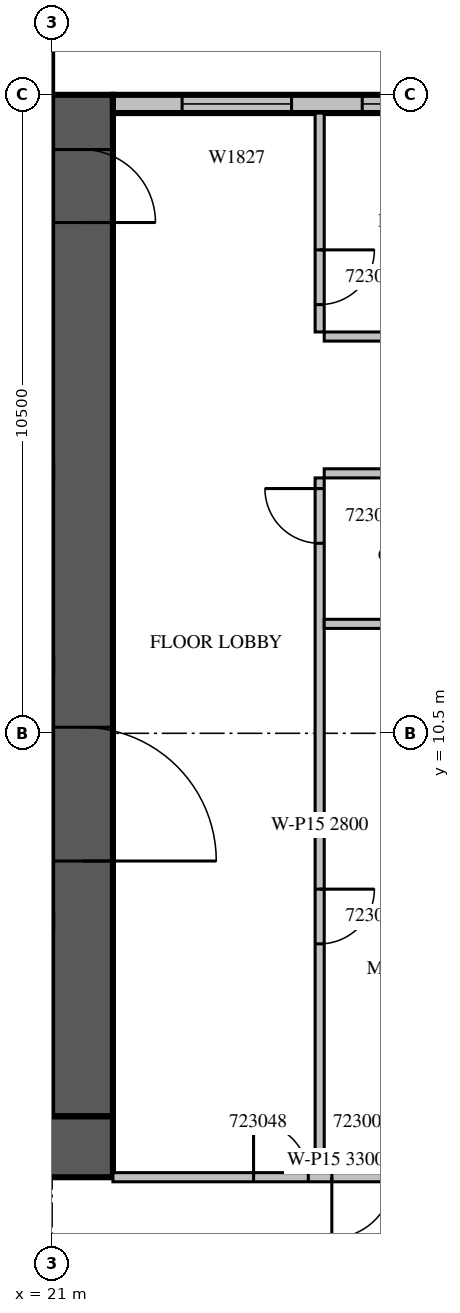
"""IFC4 building model, lengths in metres.
Left out: names, types, materials, properties, quantities, classifications, styles, units other than length and angle.
Written with IfcOpenShell. Run it as: python <this file> out.ifc"""

import sys

from ifc_helpers import new_model, si_unit, direction, frame, frame_2d, origin, place, context, subcontext, project, spatial, rectangle, extrude, source, transform, mapped, element, fill, save


model = new_model("IFC4")
c1 = context("Model", 3, precision=1e-05, world=origin(), true_north=direction((0.0, 1.0)))
c2 = subcontext(c1, "Body", "Model", "MODEL_VIEW")
j1 = project(units=[si_unit("LENGTHUNIT", "METRE"), si_unit("PLANEANGLEUNIT", "RADIAN")], contexts=[c1])
p1 = place(None, origin())
s1 = spatial("IfcSite", under=j1, at=p1, CompositionType="ELEMENT")
p2 = place(p1, origin())
s2 = spatial("IfcBuilding", under=s1, at=p2, CompositionType="ELEMENT")
p3 = place(p2, frame((0.0, 0.0, 107.7)))
s3 = spatial("IfcBuildingStorey", under=s2, at=p3, CompositionType="ELEMENT", Elevation=107.7)
m1 = source(origin(), c2, "Body", "SweptSolid", [
    extrude(rectangle(XDim=16.8, YDim=1.0, at=frame_2d((8.4, 0.0))), origin(), (0.0, 0.0, 1.0), 4.2),
])
p4 = place(p3, frame((21.5, 4.2, 0.0), z_axis=(0.0, 0.0, 1.0), x_axis=(0.0, 1.0, 0.0)))
e1 = element("IfcWall", 1, at=p4, inside=s3, PredefinedType="SHEAR", context=c2, shape_type="MappedRepresentation", body=[
    mapped(m1, transform((0.0, 0.0, 0.0), scale=1.0)),
])
m2 = source(origin(), c2, "Body", "SweptSolid", [
    extrude(rectangle(XDim=2.2, YDim=2.1, at=frame_2d((1.1, 1.05))), frame((0.0, 0.51, 0.0), z_axis=(0.0, -1.0, 0.0), x_axis=(1.0, 0.0, 0.0)), (0.0, 0.0, 1.0), 1.02),
])
p5 = place(p4, frame((4.2, 0.0, 0.0)))
e2 = element("IfcOpeningElement", 2, at=p5, cuts=e1, PredefinedType="OPENING", context=c2, shape_type="MappedRepresentation", body=[
    mapped(m2, transform((0.0, 0.0, 0.0), scale=1.0)),
])
m3 = source(origin(), c2, "Body", "SweptSolid", [
    extrude(rectangle(XDim=1.2, YDim=2.1, at=frame_2d((0.6, 1.05))), frame((0.0, 0.51, 0.0), z_axis=(0.0, -1.0, 0.0), x_axis=(1.0, 0.0, 0.0)), (0.0, 0.0, 1.0), 1.02),
])
p6 = place(p4, frame((14.7, 0.0, 0.0)))
e3 = element("IfcOpeningElement", 3, at=p6, cuts=e1, PredefinedType="OPENING", context=c2, shape_type="MappedRepresentation", body=[
    mapped(m3, transform((0.0, 0.0, 0.0), scale=1.0)),
])
m4 = source(origin(), c2, "Body", "SweptSolid", [
    extrude(rectangle(XDim=17.8, YDim=1.0, at=frame_2d((8.9, 0.0))), origin(), (0.0, 0.0, 1.0), 4.2),
])
p7 = place(p3, frame((4.2, 3.7, 0.0), z_axis=(0.0, 0.0, 1.0), x_axis=(1.0, 0.0, 0.0)))
e4 = element("IfcWall", 4, at=p7, inside=s3, PredefinedType="SHEAR", context=c2, shape_type="MappedRepresentation", body=[
    mapped(m4, transform((0.0, 0.0, 0.0), scale=1.0)),
])
m5 = source(origin(), c2, "Body", "SweptSolid", [
    extrude(rectangle(XDim=6.875, YDim=0.3, at=frame_2d((3.438, 0.0))), origin(), (0.0, 0.0, 1.0), 3.8),
])
p8 = place(p3, frame((28.875, 20.85, 0.0), z_axis=(0.0, 0.0, 1.0), x_axis=(-1.0, 0.0, 0.0)))
e5 = element("IfcWall", 5, at=p8, inside=s3, PredefinedType="STANDARD", context=c2, shape_type="MappedRepresentation", body=[
    mapped(m5, transform((0.0, 0.0, 0.0), scale=1.0)),
])
m6 = source(origin(), c2, "Body", "SweptSolid", [
    extrude(rectangle(XDim=2.4, YDim=2.7, at=frame_2d((1.2, 1.35))), frame((0.0, 0.16, 0.0), z_axis=(0.0, -1.0, 0.0), x_axis=(1.0, 0.0, 0.0)), (0.0, 0.0, 1.0), 0.32),
])
p9 = place(p8, frame((0.375, 0.0, 0.6)))
e6 = element("IfcOpeningElement", 6, at=p9, cuts=e5, PredefinedType="OPENING", context=c2, shape_type="MappedRepresentation", body=[
    mapped(m6, transform((0.0, 0.0, 0.0), scale=1.0)),
])
m7 = source(origin(), c2, "Body", "SweptSolid", [
    extrude(rectangle(XDim=1.8, YDim=2.7, at=frame_2d((0.9, 1.35))), frame((0.0, 0.16, 0.0), z_axis=(0.0, -1.0, 0.0), x_axis=(1.0, 0.0, 0.0)), (0.0, 0.0, 1.0), 0.32),
])
p10 = place(p8, frame((3.938, 0.0, 0.6)))
e7 = element("IfcOpeningElement", 7, at=p10, cuts=e5, PredefinedType="OPENING", context=c2, shape_type="MappedRepresentation", body=[
    mapped(m7, transform((0.0, 0.0, 0.0), scale=1.0)),
])
p11 = place(p3, frame((25.4, 14.7, 0.0), z_axis=(0.0, 0.0, 1.0), x_axis=(0.0, -1.0, 0.0)))
e8 = element("IfcWall", 8, at=p11, inside=s3, PredefinedType="PARTITIONING", context=c2, shape_type="SweptSolid", body=[
    extrude(rectangle(XDim=11.425, YDim=0.15, at=frame_2d((5.713, 0.0))), origin(), (0.0, 0.0, 1.0), 2.8),
])
m8 = source(origin(), c2, "Body", "SweptSolid", [
    extrude(rectangle(XDim=0.9, YDim=2.1, at=frame_2d((0.45, 1.05))), frame((0.0, 0.085, 0.0), z_axis=(0.0, -1.0, 0.0), x_axis=(1.0, 0.0, 0.0)), (0.0, 0.0, 1.0), 0.17),
])
p12 = place(p11, frame((6.763, 0.0, 0.0)))
e9 = element("IfcOpeningElement", 9, at=p12, cuts=e8, PredefinedType="OPENING", context=c2, shape_type="MappedRepresentation", body=[
    mapped(m8, transform((0.0, 0.0, 0.0), scale=1.0)),
])
p13 = place(p11, frame((0.175, 0.0, 0.0)))
e10 = element("IfcOpeningElement", 10, at=p13, cuts=e8, PredefinedType="OPENING", context=c2, shape_type="MappedRepresentation", body=[
    mapped(m8, transform((0.0, 0.0, 0.0), scale=1.0)),
])
m9 = source(origin(), c2, "Body", "SweptSolid", [
    extrude(rectangle(XDim=3.6, YDim=0.15, at=frame_2d((1.8, 0.0))), origin(), (0.0, 0.0, 1.0), 3.8),
])
p14 = place(p3, frame((25.4, 20.7, 0.0), z_axis=(0.0, 0.0, 1.0), x_axis=(0.0, -1.0, 0.0)))
e11 = element("IfcWall", 11, at=p14, inside=s3, PredefinedType="PARTITIONING", context=c2, shape_type="MappedRepresentation", body=[
    mapped(m9, transform((0.0, 0.0, 0.0), scale=1.0)),
])
p15 = place(p14, frame((2.25, 0.0, 0.0)))
e12 = element("IfcOpeningElement", 12, at=p15, cuts=e11, PredefinedType="OPENING", context=c2, shape_type="MappedRepresentation", body=[
    mapped(m8, transform((0.0, 0.0, 0.0), scale=1.0)),
])
m10 = source(origin(), c2, "Body", "SweptSolid", [
    extrude(rectangle(XDim=3.85, YDim=0.15, at=frame_2d((1.925, 0.0))), origin(), (0.0, 0.0, 1.0), 3.8),
])
for number, where, z_axis, x_axis in (
    (13, (29.325, 12.3, 0.0), (0.0, 0.0, 1.0), (-1.0, 0.0, 0.0)),
    (14, (29.325, 14.775, 0.0), (0.0, 0.0, 1.0), (-1.0, 0.0, 0.0)),
    (15, (25.475, 17.025, 0.0), (0.0, 0.0, 1.0), (1.0, 0.0, 0.0)),
):
    element("IfcWall", number, at=place(p3, frame(where, z_axis=z_axis, x_axis=x_axis)), inside=s3, PredefinedType="PARTITIONING", context=c2, shape_type="MappedRepresentation", body=[
        mapped(m10, transform((0.0, 0.0, 0.0), scale=1.0)),
    ])
p16 = place(p3, frame((22.0, 3.2, 0.0), z_axis=(0.0, 0.0, 1.0), x_axis=(1.0, 0.0, 0.0)))
e16 = element("IfcWall", 16, at=p16, inside=s3, PredefinedType="PARTITIONING", context=c2, shape_type="SweptSolid", body=[
    extrude(rectangle(XDim=7.325, YDim=0.15, at=frame_2d((3.663, 0.0))), origin(), (0.0, 0.0, 1.0), 3.3),
])
m11 = source(origin(), c2, "Body", "SweptSolid", [
    extrude(rectangle(XDim=1.0, YDim=2.1, at=frame_2d((0.5, 1.05))), frame((0.0, 0.085, 0.0), z_axis=(0.0, -1.0, 0.0), x_axis=(1.0, 0.0, 0.0)), (0.0, 0.0, 1.0), 0.17),
])
p17 = place(p16, frame((3.6, 0.0, 0.0)))
e17 = element("IfcOpeningElement", 17, at=p17, cuts=e16, PredefinedType="OPENING", context=c2, shape_type="MappedRepresentation", body=[
    mapped(m11, transform((0.0, 0.0, 0.0), scale=1.0)),
])
p18 = place(p16, frame((2.313, 0.0, 0.0)))
e18 = element("IfcOpeningElement", 18, at=p18, cuts=e16, PredefinedType="OPENING", context=c2, shape_type="MappedRepresentation", body=[
    mapped(m8, transform((0.0, 0.0, 0.0), scale=1.0)),
])
m12 = source(origin(), c2, "Body", "SweptSolid", [
    extrude(rectangle(XDim=2.4, YDim=2.7, at=frame_2d((1.2, 1.35))), frame((0.0, 0.03, 0.0), z_axis=(0.0, -1.0, 0.0), x_axis=(1.0, 0.0, 0.0)), (0.0, 0.0, 1.0), 0.06),
])
p19 = place(p9, origin())
e19 = element("IfcWindow", 19, at=p19, inside=s3, PartitioningType="SINGLE_PANEL", PredefinedType="WINDOW", context=c2, shape_type="MappedRepresentation", body=[
    mapped(m12, transform((0.0, 0.0, 0.0), scale=1.0)),
])
fill(e6, e19)
m13 = source(origin(), c2, "Body", "SweptSolid", [
    extrude(rectangle(XDim=1.8, YDim=2.7, at=frame_2d((0.9, 1.35))), frame((0.0, 0.03, 0.0), z_axis=(0.0, -1.0, 0.0), x_axis=(1.0, 0.0, 0.0)), (0.0, 0.0, 1.0), 0.06),
])
p20 = place(p10, origin())
e20 = element("IfcWindow", 20, at=p20, inside=s3, PartitioningType="SINGLE_PANEL", PredefinedType="WINDOW", context=c2, shape_type="MappedRepresentation", body=[
    mapped(m13, transform((0.0, 0.0, 0.0), scale=1.0)),
])
fill(e7, e20)
m14 = source(origin(), c2, "Body", "SweptSolid", [
    extrude(rectangle(XDim=2.2, YDim=2.1, at=frame_2d((1.1, 1.05))), frame((0.0, 0.025, 0.0), z_axis=(0.0, -1.0, 0.0), x_axis=(1.0, 0.0, 0.0)), (0.0, 0.0, 1.0), 0.05),
])
p21 = place(p5, origin())
e21 = element("IfcDoor", 21, at=p21, inside=s3, OperationType="DOUBLE_DOOR_SINGLE_SWING", PredefinedType="DOOR", context=c2, shape_type="MappedRepresentation", body=[
    mapped(m14, transform((0.0, 0.0, 0.0), scale=1.0)),
])
fill(e2, e21)
m15 = source(origin(), c2, "Body", "SweptSolid", [
    extrude(rectangle(XDim=1.2, YDim=2.1, at=frame_2d((0.6, 1.05))), frame((0.0, 0.025, 0.0), z_axis=(0.0, -1.0, 0.0), x_axis=(1.0, 0.0, 0.0)), (0.0, 0.0, 1.0), 0.05),
])
p22 = place(p6, origin())
e22 = element("IfcDoor", 22, at=p22, inside=s3, OperationType="SINGLE_SWING_RIGHT", PredefinedType="DOOR", context=c2, shape_type="MappedRepresentation", body=[
    mapped(m15, transform((0.0, 0.0, 0.0), scale=1.0)),
])
fill(e3, e22)
m16 = source(origin(), c2, "Body", "SweptSolid", [
    extrude(rectangle(XDim=0.9, YDim=2.1, at=frame_2d((0.45, 1.05))), frame((0.0, 0.025, 0.0), z_axis=(0.0, -1.0, 0.0), x_axis=(1.0, 0.0, 0.0)), (0.0, 0.0, 1.0), 0.05),
])
p23 = place(p12, origin())
e23 = element("IfcDoor", 23, at=p23, inside=s3, OperationType="SINGLE_SWING_LEFT", PredefinedType="DOOR", context=c2, shape_type="MappedRepresentation", body=[
    mapped(m16, transform((0.0, 0.0, 0.0), scale=1.0)),
])
fill(e9, e23)
p24 = place(p13, origin())
e24 = element("IfcDoor", 24, at=p24, inside=s3, OperationType="SINGLE_SWING_RIGHT", PredefinedType="DOOR", context=c2, shape_type="MappedRepresentation", body=[
    mapped(m16, transform((0.0, 0.0, 0.0), scale=1.0)),
])
fill(e10, e24)
p25 = place(p15, origin())
e25 = element("IfcDoor", 25, at=p25, inside=s3, OperationType="SINGLE_SWING_LEFT", PredefinedType="DOOR", context=c2, shape_type="MappedRepresentation", body=[
    mapped(m16, transform((0.0, 0.0, 0.0), scale=1.0)),
])
fill(e12, e25)
m17 = source(origin(), c2, "Body", "SweptSolid", [
    extrude(rectangle(XDim=1.0, YDim=2.1, at=frame_2d((0.5, 1.05))), frame((0.0, 0.025, 0.0), z_axis=(0.0, -1.0, 0.0), x_axis=(1.0, 0.0, 0.0)), (0.0, 0.0, 1.0), 0.05),
])
p26 = place(p17, origin())
e26 = element("IfcDoor", 26, at=p26, inside=s3, OperationType="SINGLE_SWING_RIGHT", PredefinedType="DOOR", context=c2, shape_type="MappedRepresentation", body=[
    mapped(m17, transform((0.0, 0.0, 0.0), scale=1.0)),
])
fill(e17, e26)
p27 = place(p18, origin())
e27 = element("IfcDoor", 27, at=p27, inside=s3, OperationType="SINGLE_SWING_LEFT", PredefinedType="DOOR", context=c2, shape_type="MappedRepresentation", body=[
    mapped(m16, transform((0.0, 0.0, 0.0), scale=1.0)),
])
fill(e18, e27)
save(model, sys.argv[1])
